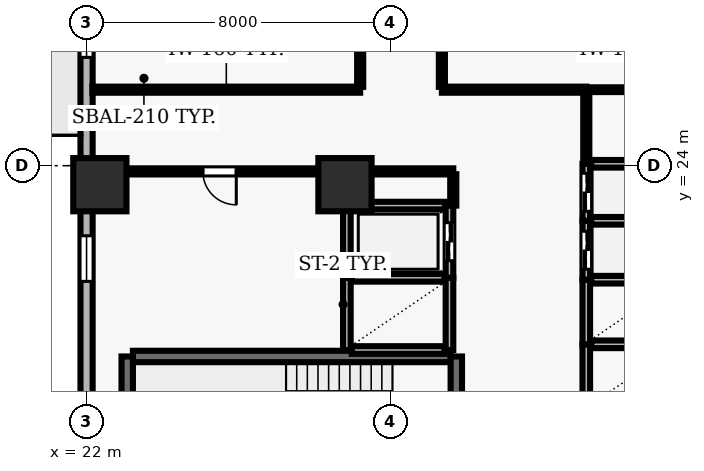
"""IFC4 building model, lengths in metres.
Left out: names, types, materials, properties, quantities, classifications, styles, units other than length and angle.
Written with IfcOpenShell. Run it as: python <this file> out.ifc"""

import sys

from ifc_helpers import new_model, si_unit, direction, frame, frame_2d, origin, origin_2d, place, context, subcontext, project, spatial, rectangle, extrude, element, fill, save


model = new_model("IFC4")
c1 = context("Model", 3, precision=1e-05, world=origin(), true_north=direction((0.0, 1.0)))
c2 = subcontext(c1, "Body", "Model", "MODEL_VIEW")
j1 = project(units=[si_unit("LENGTHUNIT", "METRE"), si_unit("PLANEANGLEUNIT", "RADIAN")], contexts=[c1])
p1 = place(None, origin())
s1 = spatial("IfcSite", under=j1, at=p1, CompositionType="ELEMENT")
p2 = place(p1, origin())
s2 = spatial("IfcBuilding", under=s1, at=p2, CompositionType="ELEMENT")
p3 = place(p2, frame((0.0, 0.0, 54.4)))
s3 = spatial("IfcBuildingStorey", under=s2, at=p3, CompositionType="ELEMENT", Elevation=54.4)
for number, where, z_axis, x_axis in (
    (1, (22.35, 23.5, 0.0), (0.0, 0.0, 1.0), (1.0, 0.0, 0.0)),
    (2, (28.8, 23.5, 0.0), (0.0, 0.0, 1.0), (1.0, 0.0, 0.0)),
):
    element("IfcColumn", number, at=place(p3, frame(where, z_axis=z_axis, x_axis=x_axis)), inside=s3, PredefinedType="COLUMN", context=c2, shape_type="SweptSolid", body=[
        extrude(rectangle(XDim=1.4, YDim=1.4, at=origin_2d()), origin(), (0.0, 0.0, 1.0), 3.9),
    ])
p4 = place(p3, frame((22.0, 51.5, 0.0), z_axis=(0.0, 0.0, 1.0), x_axis=(0.0, -1.0, 0.0)))
e3 = element("IfcWall", 3, at=p4, inside=s3, PredefinedType="SOLIDWALL", context=c2, shape_type="SweptSolid", body=[
    extrude(rectangle(XDim=49.0, YDim=0.32, at=frame_2d((24.5, 0.0))), origin(), (0.0, 0.0, 1.0), 3.69),
])
p5 = place(p4, frame((17.8, 0.0, 0.0)))
e4 = element("IfcOpeningElement", 4, at=p5, cuts=e3, PredefinedType="OPENING", context=c2, shape_type="SweptSolid", body=[
    extrude(rectangle(XDim=1.0, YDim=2.2, at=frame_2d((0.5, 1.1))), frame((0.0, 0.17, 0.0), z_axis=(0.0, -1.0, 0.0), x_axis=(1.0, 0.0, 0.0)), (0.0, 0.0, 1.0), 0.34),
])
p6 = place(p4, frame((2.122, 0.0, 0.9)))
e5 = element("IfcOpeningElement", 5, at=p6, cuts=e3, PredefinedType="OPENING", context=c2, shape_type="SweptSolid", body=[
    extrude(rectangle(XDim=1.2, YDim=1.6, at=frame_2d((0.6, 0.8))), frame((0.0, 0.17, 0.0), z_axis=(0.0, -1.0, 0.0), x_axis=(1.0, 0.0, 0.0)), (0.0, 0.0, 1.0), 0.34),
])
p7 = place(p4, frame((7.567, 0.0, 0.9)))
e6 = element("IfcOpeningElement", 6, at=p7, cuts=e3, PredefinedType="OPENING", context=c2, shape_type="SweptSolid", body=[
    extrude(rectangle(XDim=1.2, YDim=1.6, at=frame_2d((0.6, 0.8))), frame((0.0, 0.17, 0.0), z_axis=(0.0, -1.0, 0.0), x_axis=(1.0, 0.0, 0.0)), (0.0, 0.0, 1.0), 0.34),
])
p8 = place(p4, frame((13.011, 0.0, 0.9)))
e7 = element("IfcOpeningElement", 7, at=p8, cuts=e3, PredefinedType="OPENING", context=c2, shape_type="SweptSolid", body=[
    extrude(rectangle(XDim=1.2, YDim=1.6, at=frame_2d((0.6, 0.8))), frame((0.0, 0.17, 0.0), z_axis=(0.0, -1.0, 0.0), x_axis=(1.0, 0.0, 0.0)), (0.0, 0.0, 1.0), 0.34),
])
p9 = place(p4, frame((19.356, 0.0, 0.9)))
e8 = element("IfcOpeningElement", 8, at=p9, cuts=e3, PredefinedType="OPENING", context=c2, shape_type="SweptSolid", body=[
    extrude(rectangle(XDim=1.2, YDim=1.6, at=frame_2d((0.6, 0.8))), frame((0.0, 0.17, 0.0), z_axis=(0.0, -1.0, 0.0), x_axis=(1.0, 0.0, 0.0)), (0.0, 0.0, 1.0), 0.34),
])
p10 = place(p4, frame((23.45, 0.0, 0.9)))
e9 = element("IfcOpeningElement", 9, at=p10, cuts=e3, PredefinedType="OPENING", context=c2, shape_type="SweptSolid", body=[
    extrude(rectangle(XDim=1.2, YDim=1.6, at=frame_2d((0.6, 0.8))), frame((0.0, 0.17, 0.0), z_axis=(0.0, -1.0, 0.0), x_axis=(1.0, 0.0, 0.0)), (0.0, 0.0, 1.0), 0.34),
])
p11 = place(p4, frame((29.344, 0.0, 0.9)))
e10 = element("IfcOpeningElement", 10, at=p11, cuts=e3, PredefinedType="OPENING", context=c2, shape_type="SweptSolid", body=[
    extrude(rectangle(XDim=1.2, YDim=1.6, at=frame_2d((0.6, 0.8))), frame((0.0, 0.17, 0.0), z_axis=(0.0, -1.0, 0.0), x_axis=(1.0, 0.0, 0.0)), (0.0, 0.0, 1.0), 0.34),
])
p12 = place(p4, frame((34.789, 0.0, 0.9)))
e11 = element("IfcOpeningElement", 11, at=p12, cuts=e3, PredefinedType="OPENING", context=c2, shape_type="SweptSolid", body=[
    extrude(rectangle(XDim=1.2, YDim=1.6, at=frame_2d((0.6, 0.8))), frame((0.0, 0.17, 0.0), z_axis=(0.0, -1.0, 0.0), x_axis=(1.0, 0.0, 0.0)), (0.0, 0.0, 1.0), 0.34),
])
p13 = place(p4, frame((40.233, 0.0, 0.9)))
e12 = element("IfcOpeningElement", 12, at=p13, cuts=e3, PredefinedType="OPENING", context=c2, shape_type="SweptSolid", body=[
    extrude(rectangle(XDim=1.2, YDim=1.6, at=frame_2d((0.6, 0.8))), frame((0.0, 0.17, 0.0), z_axis=(0.0, -1.0, 0.0), x_axis=(1.0, 0.0, 0.0)), (0.0, 0.0, 1.0), 0.34),
])
p14 = place(p4, frame((44.778, 0.0, 0.9)))
e13 = element("IfcOpeningElement", 13, at=p14, cuts=e3, PredefinedType="OPENING", context=c2, shape_type="SweptSolid", body=[
    extrude(rectangle(XDim=1.2, YDim=1.6, at=frame_2d((0.6, 0.8))), frame((0.0, 0.17, 0.0), z_axis=(0.0, -1.0, 0.0), x_axis=(1.0, 0.0, 0.0)), (0.0, 0.0, 1.0), 0.34),
])
p15 = place(p3, frame((31.58, 18.98, 0.0), z_axis=(0.0, 0.0, 1.0), x_axis=(-1.0, 0.0, 0.0)))
e14 = element("IfcWall", 14, at=p15, inside=s3, PredefinedType="SHEAR", context=c2, shape_type="SweptSolid", body=[
    extrude(rectangle(XDim=8.36, YDim=0.3, at=frame_2d((4.18, 0.0))), origin(), (0.0, 0.0, 1.0), 3.69),
])
p16 = place(p3, frame((23.07, 18.98, 0.0), z_axis=(0.0, 0.0, 1.0), x_axis=(0.0, -1.0, 0.0)))
e15 = element("IfcWall", 15, at=p16, inside=s3, PredefinedType="SHEAR", context=c2, shape_type="SweptSolid", body=[
    extrude(rectangle(XDim=3.51, YDim=0.3, at=frame_2d((1.755, 0.0))), origin(), (0.0, 0.0, 1.0), 3.69),
])
p17 = place(p3, frame((31.73, 15.47, 0.0), z_axis=(0.0, 0.0, 1.0), x_axis=(0.0, 1.0, 0.0)))
e16 = element("IfcWall", 16, at=p17, inside=s3, PredefinedType="SHEAR", context=c2, shape_type="SweptSolid", body=[
    extrude(rectangle(XDim=3.51, YDim=0.3, at=frame_2d((1.755, 0.0))), origin(), (0.0, 0.0, 1.0), 3.69),
])
p18 = place(p17, frame((1.18, 0.0, 0.0)))
e17 = element("IfcOpeningElement", 17, at=p18, cuts=e16, PredefinedType="OPENING", context=c2, shape_type="SweptSolid", body=[
    extrude(rectangle(XDim=1.15, YDim=2.15, at=frame_2d((0.575, 1.075))), frame((0.0, 0.16, 0.0), z_axis=(0.0, -1.0, 0.0), x_axis=(1.0, 0.0, 0.0)), (0.0, 0.0, 1.0), 0.32),
])
p19 = place(p3, frame((35.15, 19.3, 0.0), z_axis=(0.0, 0.0, 1.0), x_axis=(0.0, -1.0, 0.0)))
e18 = element("IfcWall", 18, at=p19, inside=s3, PredefinedType="SOLIDWALL", context=c2, shape_type="SweptSolid", body=[
    extrude(rectangle(XDim=1.7, YDim=0.2, at=frame_2d((0.85, 0.0))), origin(), (0.0, 0.0, 1.0), 3.69),
])
p20 = place(p3, frame((37.42, 19.3, 0.0), z_axis=(0.0, 0.0, 1.0), x_axis=(-1.0, 0.0, 0.0)))
e19 = element("IfcWall", 19, at=p20, inside=s3, PredefinedType="SOLIDWALL", context=c2, shape_type="SweptSolid", body=[
    extrude(rectangle(XDim=2.14, YDim=0.2, at=frame_2d((1.07, 0.0))), origin(), (0.0, 0.0, 1.0), 3.69),
])
p21 = place(p3, frame((35.15, 21.0, 0.0), z_axis=(0.0, 0.0, 1.0), x_axis=(0.0, -1.0, 0.0)))
e20 = element("IfcWall", 20, at=p21, inside=s3, PredefinedType="SOLIDWALL", context=c2, shape_type="SweptSolid", body=[
    extrude(rectangle(XDim=1.7, YDim=0.2, at=frame_2d((0.85, 0.0))), origin(), (0.0, 0.0, 1.0), 3.69),
])
p22 = place(p3, frame((37.42, 21.0, 0.0), z_axis=(0.0, 0.0, 1.0), x_axis=(-1.0, 0.0, 0.0)))
e21 = element("IfcWall", 21, at=p22, inside=s3, PredefinedType="SOLIDWALL", context=c2, shape_type="SweptSolid", body=[
    extrude(rectangle(XDim=2.14, YDim=0.2, at=frame_2d((1.07, 0.0))), origin(), (0.0, 0.0, 1.0), 3.69),
])
for number, where, z_axis, x_axis in (
    (22, (28.85, 21.05, 0.0), (0.0, 0.0, 1.0), (0.0, -1.0, 0.0)),
    (23, (31.55, 19.15, 0.0), (0.0, 0.0, 1.0), (0.0, 1.0, 0.0)),
):
    element("IfcWall", number, at=place(p3, frame(where, z_axis=z_axis, x_axis=x_axis)), inside=s3, PredefinedType="SOLIDWALL", context=c2, shape_type="SweptSolid", body=[
        extrude(rectangle(XDim=1.9, YDim=0.2, at=frame_2d((0.95, 0.0))), origin(), (0.0, 0.0, 1.0), 3.69),
    ])
for number, where, z_axis, x_axis in (
    (24, (28.98, 19.15, 0.0), (0.0, 0.0, 1.0), (1.0, 0.0, 0.0)),
    (25, (31.42, 21.05, 0.0), (0.0, 0.0, 1.0), (-1.0, 0.0, 0.0)),
):
    element("IfcWall", number, at=place(p3, frame(where, z_axis=z_axis, x_axis=x_axis)), inside=s3, PredefinedType="SOLIDWALL", context=c2, shape_type="SweptSolid", body=[
        extrude(rectangle(XDim=2.44, YDim=0.2, at=frame_2d((1.22, 0.0))), origin(), (0.0, 0.0, 1.0), 3.69),
    ])
p23 = place(p3, frame((35.15, 22.55, 0.0), z_axis=(0.0, 0.0, 1.0), x_axis=(0.0, -1.0, 0.0)))
e26 = element("IfcWall", 26, at=p23, inside=s3, PredefinedType="SOLIDWALL", context=c2, shape_type="SweptSolid", body=[
    extrude(rectangle(XDim=1.55, YDim=0.2, at=frame_2d((0.775, 0.0))), origin(), (0.0, 0.0, 1.0), 3.69),
])
p24 = place(p23, frame((0.275, 0.0, 0.0)))
e27 = element("IfcOpeningElement", 27, at=p24, cuts=e26, PredefinedType="OPENING", context=c2, shape_type="SweptSolid", body=[
    extrude(rectangle(XDim=1.0, YDim=2.1, at=frame_2d((0.5, 1.05))), frame((0.0, 0.11, 0.0), z_axis=(0.0, -1.0, 0.0), x_axis=(1.0, 0.0, 0.0)), (0.0, 0.0, 1.0), 0.22),
])
p25 = place(p3, frame((37.42, 22.55, 0.0), z_axis=(0.0, 0.0, 1.0), x_axis=(-1.0, 0.0, 0.0)))
e28 = element("IfcWall", 28, at=p25, inside=s3, PredefinedType="SOLIDWALL", context=c2, shape_type="SweptSolid", body=[
    extrude(rectangle(XDim=2.14, YDim=0.2, at=frame_2d((1.07, 0.0))), origin(), (0.0, 0.0, 1.0), 3.69),
])
p26 = place(p3, frame((35.15, 24.05, 0.0), z_axis=(0.0, 0.0, 1.0), x_axis=(0.0, -1.0, 0.0)))
e29 = element("IfcWall", 29, at=p26, inside=s3, PredefinedType="SOLIDWALL", context=c2, shape_type="SweptSolid", body=[
    extrude(rectangle(XDim=1.5, YDim=0.2, at=frame_2d((0.75, 0.0))), origin(), (0.0, 0.0, 1.0), 3.69),
])
p27 = place(p26, frame((0.25, 0.0, 0.0)))
e30 = element("IfcOpeningElement", 30, at=p27, cuts=e29, PredefinedType="OPENING", context=c2, shape_type="SweptSolid", body=[
    extrude(rectangle(XDim=1.0, YDim=2.1, at=frame_2d((0.5, 1.05))), frame((0.0, 0.11, 0.0), z_axis=(0.0, -1.0, 0.0), x_axis=(1.0, 0.0, 0.0)), (0.0, 0.0, 1.0), 0.22),
])
p28 = place(p3, frame((37.42, 24.05, 0.0), z_axis=(0.0, 0.0, 1.0), x_axis=(-1.0, 0.0, 0.0)))
e31 = element("IfcWall", 31, at=p28, inside=s3, PredefinedType="SOLIDWALL", context=c2, shape_type="SweptSolid", body=[
    extrude(rectangle(XDim=2.14, YDim=0.2, at=frame_2d((1.07, 0.0))), origin(), (0.0, 0.0, 1.0), 3.69),
])
p29 = place(p3, frame((28.85, 22.95, 0.0), z_axis=(0.0, 0.0, 1.0), x_axis=(0.0, -1.0, 0.0)))
e32 = element("IfcWall", 32, at=p29, inside=s3, PredefinedType="SOLIDWALL", context=c2, shape_type="SweptSolid", body=[
    extrude(rectangle(XDim=1.9, YDim=0.2, at=frame_2d((0.95, 0.0))), origin(), (0.0, 0.0, 1.0), 3.69),
])
p30 = place(p3, frame((31.55, 21.05, 0.0), z_axis=(0.0, 0.0, 1.0), x_axis=(0.0, 1.0, 0.0)))
e33 = element("IfcWall", 33, at=p30, inside=s3, PredefinedType="SOLIDWALL", context=c2, shape_type="SweptSolid", body=[
    extrude(rectangle(XDim=1.9, YDim=0.2, at=frame_2d((0.95, 0.0))), origin(), (0.0, 0.0, 1.0), 3.69),
])
p31 = place(p30, frame((0.45, 0.0, 0.0)))
e34 = element("IfcOpeningElement", 34, at=p31, cuts=e33, PredefinedType="OPENING", context=c2, shape_type="SweptSolid", body=[
    extrude(rectangle(XDim=1.0, YDim=2.1, at=frame_2d((0.5, 1.05))), frame((0.0, 0.11, 0.0), z_axis=(0.0, -1.0, 0.0), x_axis=(1.0, 0.0, 0.0)), (0.0, 0.0, 1.0), 0.22),
])
p32 = place(p3, frame((31.43, 22.95, 0.0), z_axis=(0.0, 0.0, 1.0), x_axis=(-1.0, 0.0, 0.0)))
e35 = element("IfcWall", 35, at=p32, inside=s3, PredefinedType="SOLIDWALL", context=c2, shape_type="SweptSolid", body=[
    extrude(rectangle(XDim=2.46, YDim=0.2, at=frame_2d((1.23, 0.0))), origin(), (0.0, 0.0, 1.0), 3.69),
])
p33 = place(p3, frame((28.8, 23.85, 0.0), z_axis=(0.0, 0.0, 1.0), x_axis=(-1.0, 0.0, 0.0)))
e36 = element("IfcWall", 36, at=p33, inside=s3, PredefinedType="PARTITIONING", context=c2, shape_type="SweptSolid", body=[
    extrude(rectangle(XDim=6.6, YDim=0.16, at=frame_2d((3.3, 0.0))), origin(), (0.0, 0.0, 1.0), 2.995),
])
p34 = place(p33, frame((2.86, 0.0, 0.0)))
e37 = element("IfcOpeningElement", 37, at=p34, cuts=e36, PredefinedType="OPENING", context=c2, shape_type="SweptSolid", body=[
    extrude(rectangle(XDim=0.88, YDim=2.1, at=frame_2d((0.44, 1.05))), frame((0.0, 0.09, 0.0), z_axis=(0.0, -1.0, 0.0), x_axis=(1.0, 0.0, 0.0)), (0.0, 0.0, 1.0), 0.18),
])
p35 = place(p3, frame((28.8, 23.85, 0.0), z_axis=(0.0, 0.0, 1.0), x_axis=(1.0, 0.0, 0.0)))
e38 = element("IfcWall", 38, at=p35, inside=s3, PredefinedType="PARTITIONING", context=c2, shape_type="SweptSolid", body=[
    extrude(rectangle(XDim=2.85, YDim=0.16, at=frame_2d((1.425, 0.0))), origin(), (0.0, 0.0, 1.0), 3.69),
])
p36 = place(p3, frame((29.2, 26.0, 0.0), z_axis=(0.0, 0.0, 1.0), x_axis=(-1.0, 0.0, 0.0)))
e39 = element("IfcWall", 39, at=p36, inside=s3, PredefinedType="PARTITIONING", context=c2, shape_type="SweptSolid", body=[
    extrude(rectangle(XDim=7.045, YDim=0.16, at=frame_2d((3.522, 0.0))), origin(), (0.0, 0.0, 1.0), 3.69),
])
p37 = place(p3, frame((35.15, 26.0, 0.0), z_axis=(0.0, 0.0, 1.0), x_axis=(-1.0, 0.0, 0.0)))
e40 = element("IfcWall", 40, at=p37, inside=s3, PredefinedType="PARTITIONING", context=c2, shape_type="SweptSolid", body=[
    extrude(rectangle(XDim=3.8, YDim=0.16, at=frame_2d((1.9, 0.0))), origin(), (0.0, 0.0, 1.0), 3.69),
])
p38 = place(p3, frame((35.15, 26.0, 0.0), z_axis=(0.0, 0.0, 1.0), x_axis=(1.0, 0.0, 0.0)))
e41 = element("IfcWall", 41, at=p38, inside=s3, PredefinedType="PARTITIONING", context=c2, shape_type="SweptSolid", body=[
    extrude(rectangle(XDim=2.7, YDim=0.125, at=frame_2d((1.35, 0.0))), origin(), (0.0, 0.0, 1.0), 3.69),
])
p39 = place(p3, frame((28.8, 22.95, 0.0), z_axis=(0.0, 0.0, 1.0), x_axis=(0.0, 1.0, 0.0)))
e42 = element("IfcWall", 42, at=p39, inside=s3, PredefinedType="PARTITIONING", context=c2, shape_type="SweptSolid", body=[
    extrude(rectangle(XDim=0.825, YDim=0.135, at=frame_2d((0.413, 0.0))), origin(), (0.0, 0.0, 1.0), 3.69),
])
p40 = place(p3, frame((29.2, 39.39, 0.0), z_axis=(0.0, 0.0, 1.0), x_axis=(0.0, -1.0, 0.0)))
e43 = element("IfcWall", 43, at=p40, inside=s3, PredefinedType="PARTITIONING", context=c2, shape_type="SweptSolid", body=[
    extrude(rectangle(XDim=13.315, YDim=0.16, at=frame_2d((6.657, 0.0))), origin(), (0.0, 0.0, 1.0), 3.69),
])
p41 = place(p40, frame((6.208, 0.0, 0.0)))
e44 = element("IfcOpeningElement", 44, at=p41, cuts=e43, PredefinedType="OPENING", context=c2, shape_type="SweptSolid", body=[
    extrude(rectangle(XDim=0.9, YDim=2.1, at=frame_2d((0.45, 1.05))), frame((0.0, 0.09, 0.0), z_axis=(0.0, -1.0, 0.0), x_axis=(1.0, 0.0, 0.0)), (0.0, 0.0, 1.0), 0.18),
])
p42 = place(p3, frame((31.35, 26.075, 0.0), z_axis=(0.0, 0.0, 1.0), x_axis=(0.0, 1.0, 0.0)))
e45 = element("IfcWall", 45, at=p42, inside=s3, PredefinedType="PARTITIONING", context=c2, shape_type="SweptSolid", body=[
    extrude(rectangle(XDim=13.28, YDim=0.16, at=frame_2d((6.64, 0.0))), origin(), (0.0, 0.0, 1.0), 3.69),
])
p43 = place(p42, frame((6.19, 0.0, 0.0)))
e46 = element("IfcOpeningElement", 46, at=p43, cuts=e45, PredefinedType="OPENING", context=c2, shape_type="SweptSolid", body=[
    extrude(rectangle(XDim=0.9, YDim=2.1, at=frame_2d((0.45, 1.05))), frame((0.0, 0.09, 0.0), z_axis=(0.0, -1.0, 0.0), x_axis=(1.0, 0.0, 0.0)), (0.0, 0.0, 1.0), 0.18),
])
p44 = place(p3, frame((31.65, 23.775, 0.0), z_axis=(0.0, 0.0, 1.0), x_axis=(0.0, -1.0, 0.0)))
e47 = element("IfcWall", 47, at=p44, inside=s3, PredefinedType="PARTITIONING", context=c2, shape_type="SweptSolid", body=[
    extrude(rectangle(XDim=0.825, YDim=0.16, at=frame_2d((0.413, 0.0))), origin(), (0.0, 0.0, 1.0), 3.69),
])
p45 = place(p3, frame((35.15, 24.07, 0.0), z_axis=(0.0, 0.0, 1.0), x_axis=(0.0, 1.0, 0.0)))
e48 = element("IfcWall", 48, at=p45, inside=s3, PredefinedType="PARTITIONING", context=c2, shape_type="SweptSolid", body=[
    extrude(rectangle(XDim=1.855, YDim=0.16, at=frame_2d((0.927, 0.0))), origin(), (0.0, 0.0, 1.0), 3.69),
])
p46 = place(p10, origin())
e49 = element("IfcWindow", 49, at=p46, inside=s3, PartitioningType="SINGLE_PANEL", PredefinedType="WINDOW", context=c2, shape_type="SweptSolid", body=[
    extrude(rectangle(XDim=1.2, YDim=1.6, at=frame_2d((0.6, 0.8))), frame((0.0, 0.03, 0.0), z_axis=(0.0, -1.0, 0.0), x_axis=(1.0, 0.0, 0.0)), (0.0, 0.0, 1.0), 0.06),
])
fill(e9, e49)
p47 = place(p11, origin())
e50 = element("IfcWindow", 50, at=p47, inside=s3, PartitioningType="SINGLE_PANEL", PredefinedType="WINDOW", context=c2, shape_type="SweptSolid", body=[
    extrude(rectangle(XDim=1.2, YDim=1.6, at=frame_2d((0.6, 0.8))), frame((0.0, 0.03, 0.0), z_axis=(0.0, -1.0, 0.0), x_axis=(1.0, 0.0, 0.0)), (0.0, 0.0, 1.0), 0.06),
])
fill(e10, e50)
p48 = place(p24, origin())
e51 = element("IfcDoor", 51, at=p48, inside=s3, OperationType="DOUBLE_DOOR_SLIDING", PredefinedType="DOOR", context=c2, shape_type="SweptSolid", body=[
    extrude(rectangle(XDim=1.0, YDim=2.1, at=frame_2d((0.5, 1.05))), frame((0.0, 0.025, 0.0), z_axis=(0.0, -1.0, 0.0), x_axis=(1.0, 0.0, 0.0)), (0.0, 0.0, 1.0), 0.05),
])
fill(e27, e51)
p49 = place(p27, origin())
e52 = element("IfcDoor", 52, at=p49, inside=s3, OperationType="DOUBLE_DOOR_SLIDING", PredefinedType="DOOR", context=c2, shape_type="SweptSolid", body=[
    extrude(rectangle(XDim=1.0, YDim=2.1, at=frame_2d((0.5, 1.05))), frame((0.0, 0.025, 0.0), z_axis=(0.0, -1.0, 0.0), x_axis=(1.0, 0.0, 0.0)), (0.0, 0.0, 1.0), 0.05),
])
fill(e30, e52)
p50 = place(p31, origin())
e53 = element("IfcDoor", 53, at=p50, inside=s3, OperationType="DOUBLE_DOOR_SLIDING", PredefinedType="DOOR", context=c2, shape_type="SweptSolid", body=[
    extrude(rectangle(XDim=1.0, YDim=2.1, at=frame_2d((0.5, 1.05))), frame((0.0, 0.025, 0.0), z_axis=(0.0, -1.0, 0.0), x_axis=(1.0, 0.0, 0.0)), (0.0, 0.0, 1.0), 0.05),
])
fill(e34, e53)
p51 = place(p34, origin())
e54 = element("IfcDoor", 54, at=p51, inside=s3, OperationType="SINGLE_SWING_LEFT", PredefinedType="DOOR", context=c2, shape_type="SweptSolid", body=[
    extrude(rectangle(XDim=0.88, YDim=2.1, at=frame_2d((0.44, 1.05))), frame((0.0, 0.025, 0.0), z_axis=(0.0, -1.0, 0.0), x_axis=(1.0, 0.0, 0.0)), (0.0, 0.0, 1.0), 0.05),
])
fill(e37, e54)
save(model, sys.argv[1])
